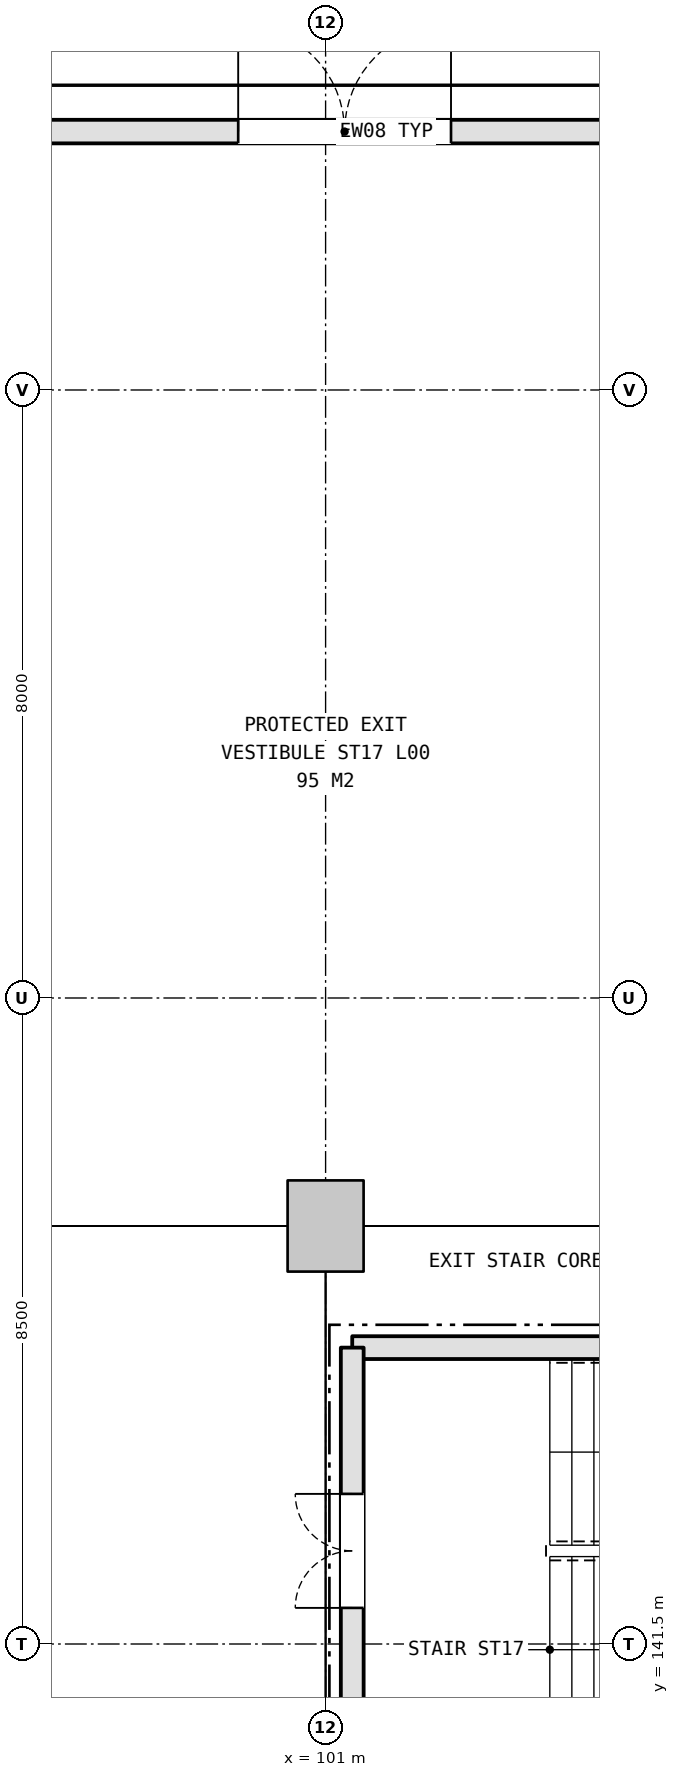
"""IFC4 building model, lengths in metres.
Left out: names, types, materials, properties, quantities, classifications, styles, units other than length and angle.
Written with IfcOpenShell. Run it as: python <this file> out.ifc"""

import sys

from ifc_helpers import new_model, si_unit, direction, frame, frame_2d, origin, origin_2d, place, context, subcontext, project, spatial, rectangle, extrude, element, fill, save


model = new_model("IFC4")
c1 = context("Model", 3, precision=1e-05, world=origin(), true_north=direction((0.0, 1.0)))
c2 = subcontext(c1, "Body", "Model", "MODEL_VIEW")
j1 = project(units=[si_unit("LENGTHUNIT", "METRE"), si_unit("PLANEANGLEUNIT", "RADIAN")], contexts=[c1])
p1 = place(None, origin())
s1 = spatial("IfcSite", under=j1, at=p1, CompositionType="ELEMENT")
p2 = place(p1, origin())
s2 = spatial("IfcBuilding", under=s1, at=p2, CompositionType="ELEMENT")
p3 = place(p2, origin())
s3 = spatial("IfcBuildingStorey", under=s2, at=p3, CompositionType="ELEMENT", Elevation=0.0)
p4 = place(p3, frame((101.0, 147.0, 0.0), z_axis=(0.0, 0.0, 1.0), x_axis=(1.0, 0.0, 0.0)))
e1 = element("IfcColumn", 1, at=p4, inside=s3, PredefinedType="COLUMN", context=c2, shape_type="SweptSolid", body=[
    extrude(rectangle(XDim=1.0, YDim=1.2, at=origin_2d()), origin(), (0.0, 0.0, 1.0), 5.4),
])
p5 = place(p3, frame((96.938, 161.4, 0.0), z_axis=(0.0, 0.0, 1.0), x_axis=(1.0, 0.0, 0.0)))
e2 = element("IfcWall", 2, at=p5, inside=s3, PredefinedType="STANDARD", context=c2, shape_type="SweptSolid", body=[
    extrude(rectangle(XDim=8.624, YDim=0.31, at=frame_2d((4.312, 0.0))), origin(), (0.0, 0.0, 1.0), 4.592),
])
p6 = place(p5, frame((2.912, 0.0, 0.0)))
e3 = element("IfcOpeningElement", 3, at=p6, cuts=e2, PredefinedType="OPENING", context=c2, shape_type="SweptSolid", body=[
    extrude(rectangle(XDim=2.8, YDim=2.5, at=frame_2d((1.4, 1.25))), frame((0.0, 0.165, 0.0), z_axis=(0.0, -1.0, 0.0), x_axis=(1.0, 0.0, 0.0)), (0.0, 0.0, 1.0), 0.33),
])
p7 = place(p3, frame((110.65, 145.4, 0.0), z_axis=(0.0, 0.0, 1.0), x_axis=(-1.0, 0.0, 0.0)))
e4 = element("IfcWall", 4, at=p7, inside=s3, PredefinedType="SHEAR", context=c2, shape_type="SweptSolid", body=[
    extrude(rectangle(XDim=9.299, YDim=0.3, at=frame_2d((4.65, 0.0))), origin(), (0.0, 0.0, 1.0), 5.14),
])
p8 = place(p3, frame((101.35, 145.4, 0.0), z_axis=(0.0, 0.0, 1.0), x_axis=(0.0, -1.0, 0.0)))
e5 = element("IfcWall", 5, at=p8, inside=s3, PredefinedType="SHEAR", context=c2, shape_type="SweptSolid", body=[
    extrude(rectangle(XDim=5.349, YDim=0.3, at=frame_2d((2.675, 0.0))), origin(), (0.0, 0.0, 1.0), 5.14),
])
p9 = place(p8, frame((1.925, 0.0, 0.0)))
e6 = element("IfcOpeningElement", 6, at=p9, cuts=e5, PredefinedType="OPENING", context=c2, shape_type="SweptSolid", body=[
    extrude(rectangle(XDim=1.5, YDim=2.2, at=frame_2d((0.75, 1.1))), frame((0.0, 0.16, 0.0), z_axis=(0.0, -1.0, 0.0), x_axis=(1.0, 0.0, 0.0)), (0.0, 0.0, 1.0), 0.32),
])
p10 = place(p6, origin())
e7 = element("IfcDoor", 7, at=p10, inside=s3, OperationType="DOUBLE_DOOR_SINGLE_SWING", PredefinedType="DOOR", context=c2, shape_type="SweptSolid", body=[
    extrude(rectangle(XDim=2.8, YDim=2.5, at=frame_2d((1.4, 1.25))), frame((0.0, 0.025, 0.0), z_axis=(0.0, -1.0, 0.0), x_axis=(1.0, 0.0, 0.0)), (0.0, 0.0, 1.0), 0.05),
])
fill(e3, e7)
p11 = place(p9, frame((1.5, 0.0, 0.0), z_axis=(0.0, 0.0, 1.0), x_axis=(-1.0, 0.0, 0.0)))
e8 = element("IfcDoor", 8, at=p11, inside=s3, OperationType="DOUBLE_DOOR_SINGLE_SWING", PredefinedType="DOOR", context=c2, shape_type="SweptSolid", body=[
    extrude(rectangle(XDim=1.5, YDim=2.2, at=frame_2d((0.75, 1.1))), frame((0.0, 0.025, 0.0), z_axis=(0.0, -1.0, 0.0), x_axis=(1.0, 0.0, 0.0)), (0.0, 0.0, 1.0), 0.05),
])
fill(e6, e8)
save(model, sys.argv[1])
